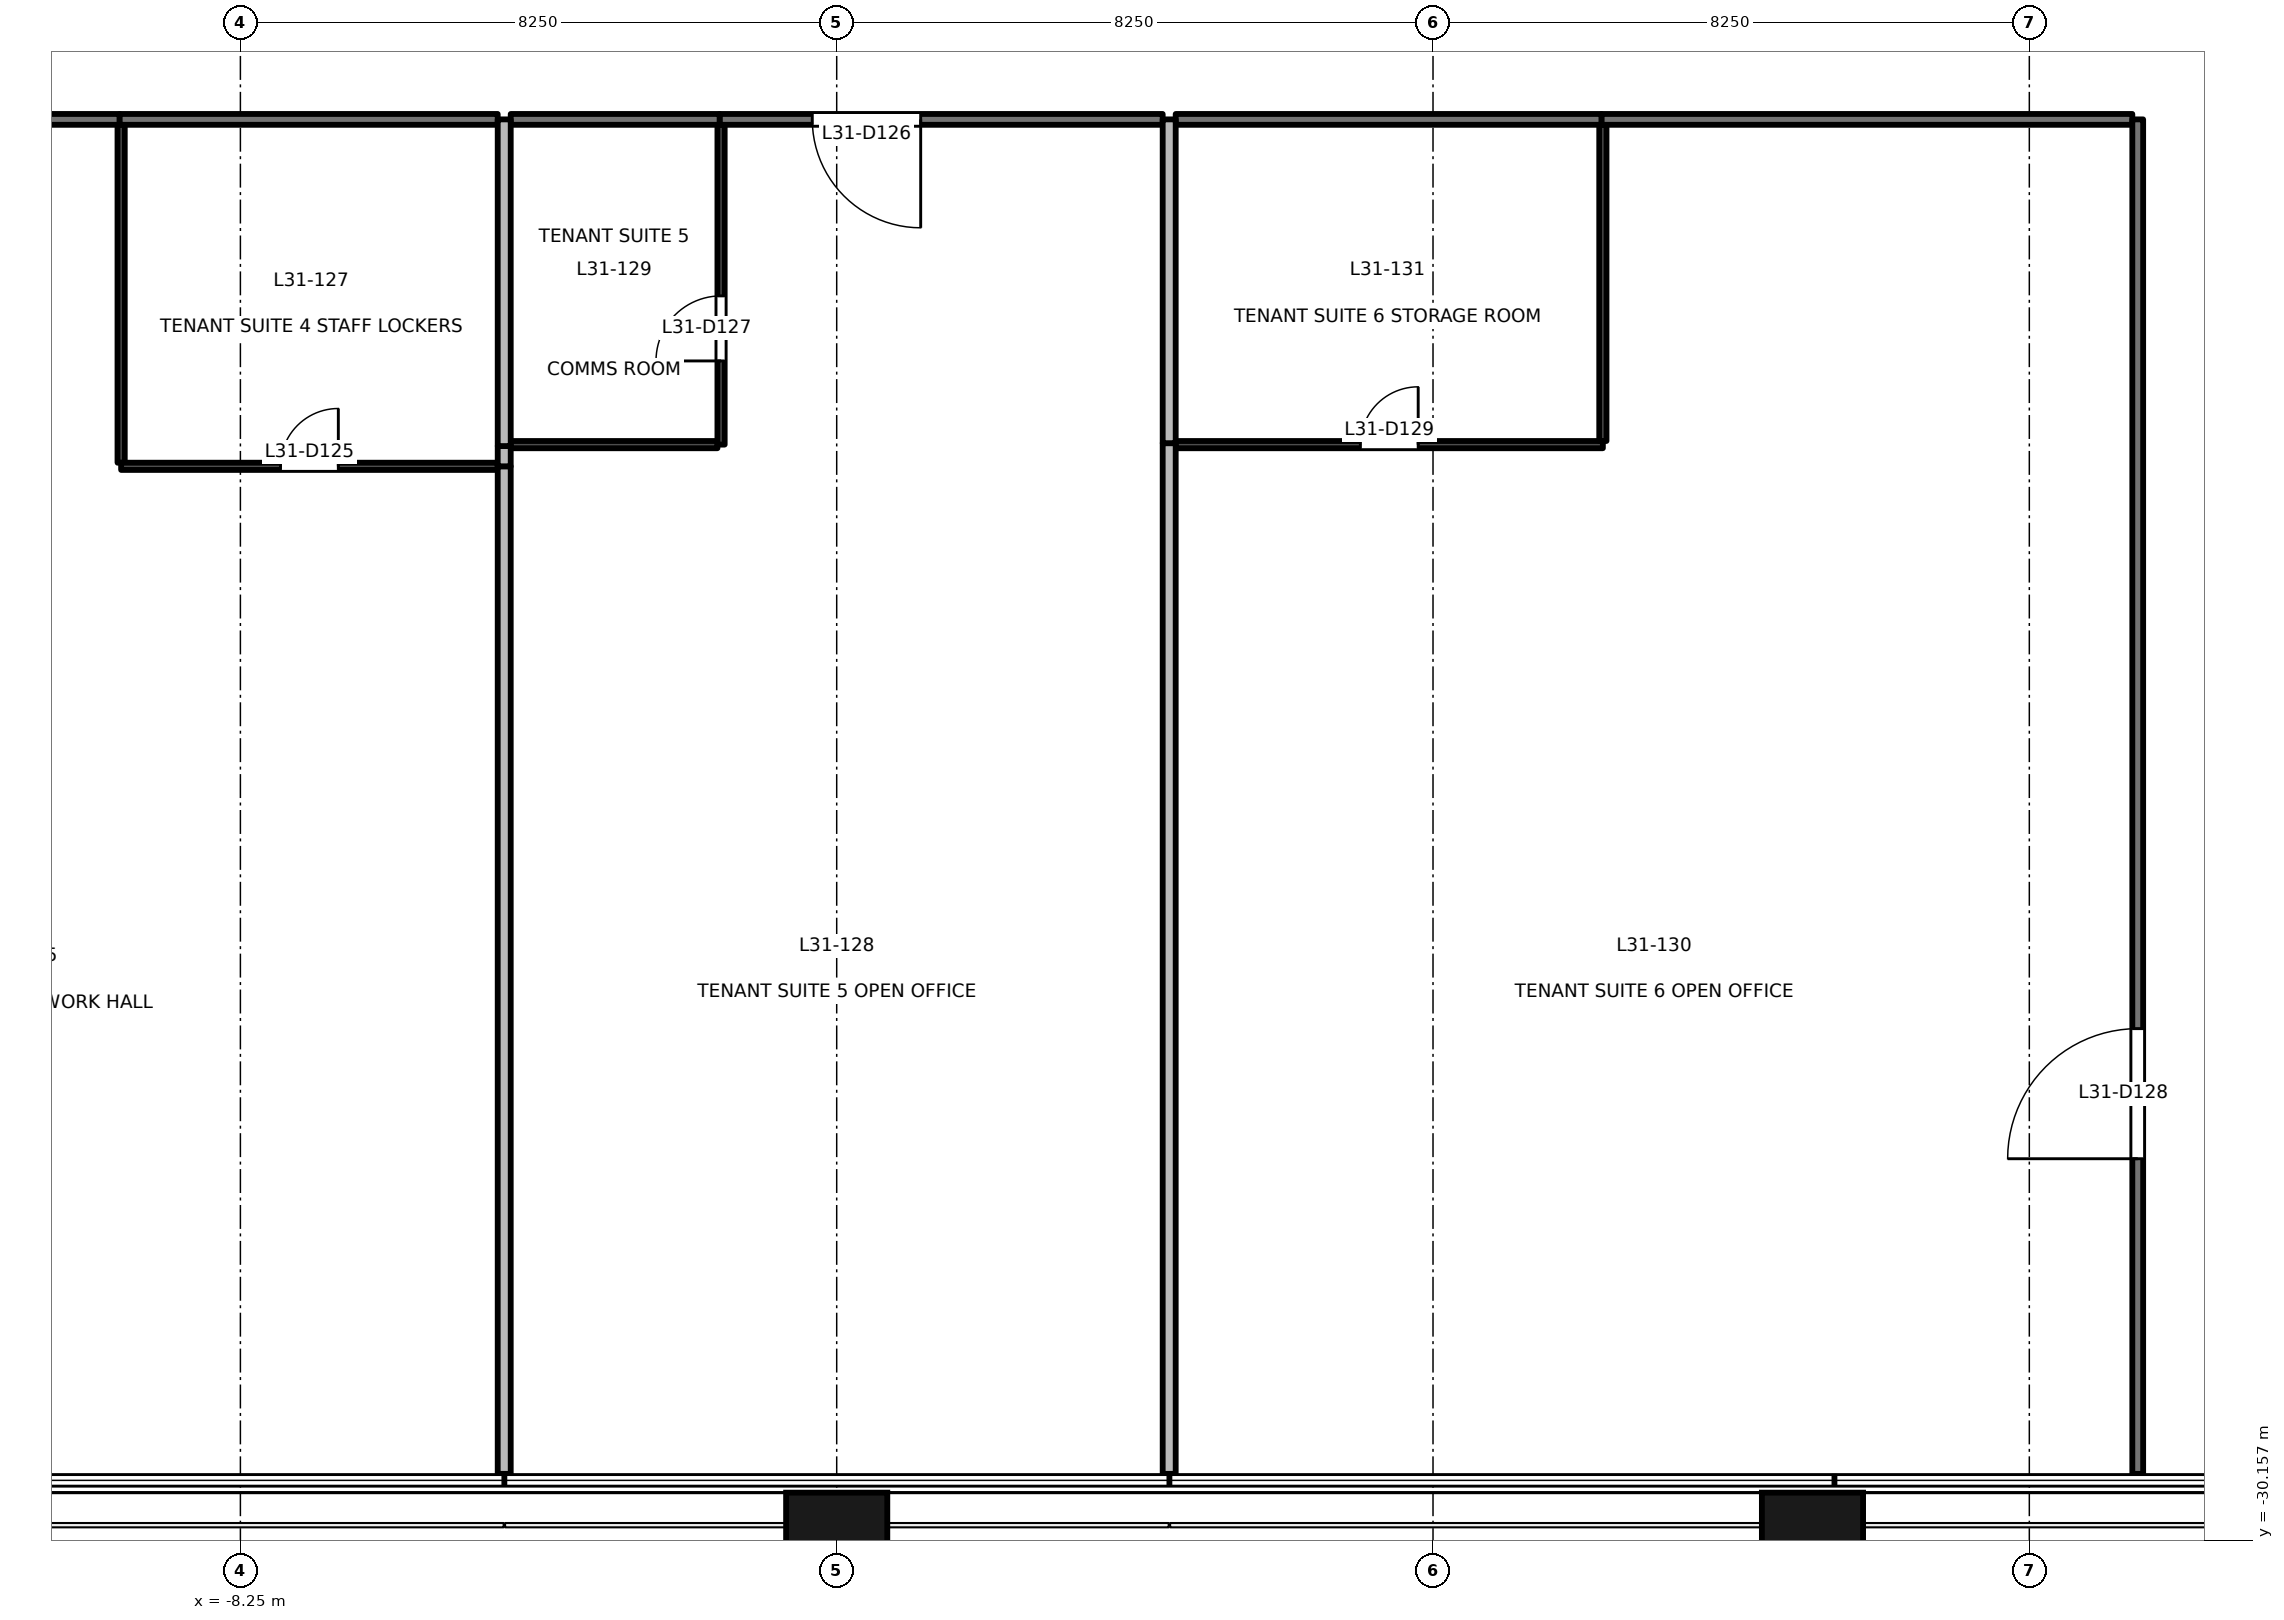
"""IFC4 building model, lengths in metres.
Left out: names, types, materials, properties, quantities, classifications, styles, units other than length and angle.
Written with IfcOpenShell. Run it as: python <this file> out.ifc"""

import sys

from ifc_helpers import new_model, si_unit, direction, frame, frame_2d, origin, origin_2d, place, context, subcontext, project, spatial, rectangle, extrude, element, fill, save


model = new_model("IFC4")
c1 = context("Model", 3, precision=1e-05, world=origin(), true_north=direction((0.0, 1.0)))
c2 = subcontext(c1, "Body", "Model", "MODEL_VIEW")
j1 = project(units=[si_unit("LENGTHUNIT", "METRE"), si_unit("PLANEANGLEUNIT", "RADIAN")], contexts=[c1])
p1 = place(None, origin())
s1 = spatial("IfcSite", under=j1, at=p1, CompositionType="ELEMENT")
p2 = place(p1, origin())
s2 = spatial("IfcBuilding", under=s1, at=p2, CompositionType="ELEMENT")
p3 = place(p2, frame((0.0, 0.0, 138.1)))
s3 = spatial("IfcBuildingStorey", under=s2, at=p3, CompositionType="ELEMENT", Elevation=138.1)
for number, where, z_axis, x_axis in (
    (1, (0.0, -30.4, -0.2), (0.0, 0.0, 1.0), (1.0, 0.0, 0.0)),
    (2, (13.5, -30.4, -0.2), (0.0, 0.0, 1.0), (1.0, 0.0, 0.0)),
):
    element("IfcColumn", number, at=place(p3, frame(where, z_axis=z_axis, x_axis=x_axis)), inside=s3, PredefinedType="COLUMN", context=c2, shape_type="SweptSolid", body=[
        extrude(rectangle(XDim=1.4, YDim=1.8, at=origin_2d()), origin(), (0.0, 0.0, 1.0), 4.0),
    ])
p4 = place(p3, frame((-9.92, -10.5, 0.0), z_axis=(0.0, 0.0, 1.0), x_axis=(-1.0, 0.0, 0.0)))
e3 = element("IfcWall", 3, at=p4, inside=s3, PredefinedType="PARTITIONING", context=c2, shape_type="SweptSolid", body=[
    extrude(rectangle(XDim=5.1, YDim=0.15, at=frame_2d((2.55, 0.0))), origin(), (0.0, 0.0, 1.0), 2.9),
])
p5 = place(p3, frame((-4.69, -10.5, 0.0), z_axis=(0.0, 0.0, 1.0), x_axis=(-1.0, 0.0, 0.0)))
e4 = element("IfcWall", 4, at=p5, inside=s3, PredefinedType="PARTITIONING", context=c2, shape_type="SweptSolid", body=[
    extrude(rectangle(XDim=5.23, YDim=0.15, at=frame_2d((2.615, 0.0))), origin(), (0.0, 0.0, 1.0), 2.9),
])
p6 = place(p3, frame((4.51, -10.5, 0.0), z_axis=(0.0, 0.0, 1.0), x_axis=(-1.0, 0.0, 0.0)))
e5 = element("IfcWall", 5, at=p6, inside=s3, PredefinedType="PARTITIONING", context=c2, shape_type="SweptSolid", body=[
    extrude(rectangle(XDim=6.13, YDim=0.15, at=frame_2d((3.065, 0.0))), origin(), (0.0, 0.0, 1.0), 2.9),
])
p7 = place(p6, frame((3.348, 0.0, 0.0)))
e6 = element("IfcOpeningElement", 6, at=p7, cuts=e5, PredefinedType="OPENING", context=c2, shape_type="SweptSolid", body=[
    extrude(rectangle(XDim=1.5, YDim=2.1, at=frame_2d((0.75, 1.05))), frame((0.0, 0.085, 0.0), z_axis=(0.0, -1.0, 0.0), x_axis=(1.0, 0.0, 0.0)), (0.0, 0.0, 1.0), 0.171),
])
p8 = place(p3, frame((-1.62, -10.5, 0.0), z_axis=(0.0, 0.0, 1.0), x_axis=(-1.0, 0.0, 0.0)))
e7 = element("IfcWall", 7, at=p8, inside=s3, PredefinedType="PARTITIONING", context=c2, shape_type="SweptSolid", body=[
    extrude(rectangle(XDim=2.89, YDim=0.15, at=frame_2d((1.445, 0.0))), origin(), (0.0, 0.0, 1.0), 2.9),
])
p9 = place(p3, frame((17.925, -10.5, 0.0), z_axis=(0.0, 0.0, 1.0), x_axis=(-1.0, 0.0, 0.0)))
e8 = element("IfcWall", 8, at=p9, inside=s3, PredefinedType="PARTITIONING", context=c2, shape_type="SweptSolid", body=[
    extrude(rectangle(XDim=7.345, YDim=0.15, at=frame_2d((3.672, 0.0))), origin(), (0.0, 0.0, 1.0), 2.9),
])
p10 = place(p3, frame((18.0, -29.24, 0.0), z_axis=(0.0, 0.0, 1.0), x_axis=(0.0, 1.0, 0.0)))
e9 = element("IfcWall", 9, at=p10, inside=s3, PredefinedType="PARTITIONING", context=c2, shape_type="SweptSolid", body=[
    extrude(rectangle(XDim=18.74, YDim=0.15, at=frame_2d((9.37, 0.0))), origin(), (0.0, 0.0, 1.0), 3.8),
])
p11 = place(p10, frame((4.36, 0.0, 0.0)))
e10 = element("IfcOpeningElement", 10, at=p11, cuts=e9, PredefinedType="OPENING", context=c2, shape_type="SweptSolid", body=[
    extrude(rectangle(XDim=1.8, YDim=2.1, at=frame_2d((0.9, 1.05))), frame((0.0, 0.085, 0.0), z_axis=(0.0, -1.0, 0.0), x_axis=(1.0, 0.0, 0.0)), (0.0, 0.0, 1.0), 0.171),
])
p12 = place(p3, frame((10.58, -10.5, 0.0), z_axis=(0.0, 0.0, 1.0), x_axis=(-1.0, 0.0, 0.0)))
e11 = element("IfcWall", 11, at=p12, inside=s3, PredefinedType="PARTITIONING", context=c2, shape_type="SweptSolid", body=[
    extrude(rectangle(XDim=5.89, YDim=0.15, at=frame_2d((2.945, 0.0))), origin(), (0.0, 0.0, 1.0), 2.9),
])
p13 = place(p3, frame((-9.9, -10.575, 0.0), z_axis=(0.0, 0.0, 1.0), x_axis=(0.0, -1.0, 0.0)))
e12 = element("IfcWall", 12, at=p13, inside=s3, PredefinedType="PARTITIONING", context=c2, shape_type="SweptSolid", body=[
    extrude(rectangle(XDim=4.675, YDim=0.1, at=frame_2d((2.337, 0.0))), origin(), (0.0, 0.0, 1.0), 3.8),
])
p14 = place(p3, frame((-9.9, -15.3, 0.0), z_axis=(0.0, 0.0, 1.0), x_axis=(1.0, 0.0, 0.0)))
e13 = element("IfcWall", 13, at=p14, inside=s3, PredefinedType="PARTITIONING", context=c2, shape_type="SweptSolid", body=[
    extrude(rectangle(XDim=5.21, YDim=0.1, at=frame_2d((2.605, 0.0))), origin(), (0.0, 0.0, 1.0), 2.9),
])
p15 = place(p14, frame((2.205, 0.0, 0.0)))
e14 = element("IfcOpeningElement", 14, at=p15, cuts=e13, PredefinedType="OPENING", context=c2, shape_type="SweptSolid", body=[
    extrude(rectangle(XDim=0.8, YDim=2.1, at=frame_2d((0.4, 1.05))), frame((0.0, 0.061, 0.0), z_axis=(0.0, -1.0, 0.0), x_axis=(1.0, 0.0, 0.0)), (0.0, 0.0, 1.0), 0.121),
])
p16 = place(p3, frame((-4.6, -15.3, 0.0), z_axis=(0.0, 0.0, 1.0), x_axis=(0.0, -1.0, 0.0)))
e15 = element("IfcWall", 15, at=p16, inside=s3, PredefinedType="PARTITIONING", context=c2, shape_type="SweptSolid", body=[
    extrude(rectangle(XDim=13.94, YDim=0.18, at=frame_2d((6.97, 0.0))), origin(), (0.0, 0.0, 1.0), 2.9),
])
p17 = place(p3, frame((-4.6, -15.02, 0.0), z_axis=(0.0, 0.0, 1.0), x_axis=(0.0, -1.0, 0.0)))
e16 = element("IfcWall", 16, at=p17, inside=s3, PredefinedType="PARTITIONING", context=c2, shape_type="SweptSolid", body=[
    extrude(rectangle(XDim=0.28, YDim=0.18, at=frame_2d((0.14, 0.0))), origin(), (0.0, 0.0, 1.0), 2.9),
])
p18 = place(p3, frame((-4.6, -10.5, 0.0), z_axis=(0.0, 0.0, 1.0), x_axis=(0.0, -1.0, 0.0)))
e17 = element("IfcWall", 17, at=p18, inside=s3, PredefinedType="PARTITIONING", context=c2, shape_type="SweptSolid", body=[
    extrude(rectangle(XDim=4.52, YDim=0.18, at=frame_2d((2.26, 0.0))), origin(), (0.0, 0.0, 1.0), 2.9),
])
p19 = place(p3, frame((-4.51, -15.0, 0.0), z_axis=(0.0, 0.0, 1.0), x_axis=(1.0, 0.0, 0.0)))
e18 = element("IfcWall", 18, at=p19, inside=s3, PredefinedType="PARTITIONING", context=c2, shape_type="SweptSolid", body=[
    extrude(rectangle(XDim=2.86, YDim=0.1, at=frame_2d((1.43, 0.0))), origin(), (0.0, 0.0, 1.0), 2.9),
])
p20 = place(p3, frame((-1.6, -15.0, 0.0), z_axis=(0.0, 0.0, 1.0), x_axis=(0.0, 1.0, 0.0)))
e19 = element("IfcWall", 19, at=p20, inside=s3, PredefinedType="PARTITIONING", context=c2, shape_type="SweptSolid", body=[
    extrude(rectangle(XDim=4.425, YDim=0.1, at=frame_2d((2.212, 0.0))), origin(), (0.0, 0.0, 1.0), 3.8),
])
p21 = place(p20, frame((1.158, 0.0, 0.0)))
e20 = element("IfcOpeningElement", 20, at=p21, cuts=e19, PredefinedType="OPENING", context=c2, shape_type="SweptSolid", body=[
    extrude(rectangle(XDim=0.9, YDim=2.1, at=frame_2d((0.45, 1.05))), frame((0.0, 0.061, 0.0), z_axis=(0.0, -1.0, 0.0), x_axis=(1.0, 0.0, 0.0)), (0.0, 0.0, 1.0), 0.121),
])
p22 = place(p3, frame((4.6, -14.98, 0.0), z_axis=(0.0, 0.0, 1.0), x_axis=(0.0, -1.0, 0.0)))
e21 = element("IfcWall", 21, at=p22, inside=s3, PredefinedType="PARTITIONING", context=c2, shape_type="SweptSolid", body=[
    extrude(rectangle(XDim=14.26, YDim=0.18, at=frame_2d((7.13, 0.0))), origin(), (0.0, 0.0, 1.0), 2.9),
])
p23 = place(p3, frame((4.6, -10.5, 0.0), z_axis=(0.0, 0.0, 1.0), x_axis=(0.0, -1.0, 0.0)))
e22 = element("IfcWall", 22, at=p23, inside=s3, PredefinedType="PARTITIONING", context=c2, shape_type="SweptSolid", body=[
    extrude(rectangle(XDim=4.48, YDim=0.18, at=frame_2d((2.24, 0.0))), origin(), (0.0, 0.0, 1.0), 2.9),
])
p24 = place(p3, frame((4.69, -15.0, 0.0), z_axis=(0.0, 0.0, 1.0), x_axis=(1.0, 0.0, 0.0)))
e23 = element("IfcWall", 23, at=p24, inside=s3, PredefinedType="PARTITIONING", context=c2, shape_type="SweptSolid", body=[
    extrude(rectangle(XDim=5.91, YDim=0.1, at=frame_2d((2.955, 0.0))), origin(), (0.0, 0.0, 1.0), 2.9),
])
p25 = place(p24, frame((2.555, 0.0, 0.0)))
e24 = element("IfcOpeningElement", 24, at=p25, cuts=e23, PredefinedType="OPENING", context=c2, shape_type="SweptSolid", body=[
    extrude(rectangle(XDim=0.8, YDim=2.1, at=frame_2d((0.4, 1.05))), frame((0.0, 0.061, 0.0), z_axis=(0.0, -1.0, 0.0), x_axis=(1.0, 0.0, 0.0)), (0.0, 0.0, 1.0), 0.121),
])
p26 = place(p3, frame((10.6, -14.95, 0.0), z_axis=(0.0, 0.0, 1.0), x_axis=(0.0, 1.0, 0.0)))
e25 = element("IfcWall", 25, at=p26, inside=s3, PredefinedType="PARTITIONING", context=c2, shape_type="SweptSolid", body=[
    extrude(rectangle(XDim=4.375, YDim=0.1, at=frame_2d((2.188, 0.0))), origin(), (0.0, 0.0, 1.0), 3.8),
])
p27 = place(p15, origin())
e26 = element("IfcDoor", 26, at=p27, inside=s3, OperationType="SINGLE_SWING_RIGHT", PredefinedType="DOOR", context=c2, shape_type="SweptSolid", body=[
    extrude(rectangle(XDim=0.8, YDim=2.1, at=frame_2d((0.4, 1.05))), frame((0.0, 0.025, 0.0), z_axis=(0.0, -1.0, 0.0), x_axis=(1.0, 0.0, 0.0)), (0.0, 0.0, 1.0), 0.05),
])
fill(e14, e26)
p28 = place(p7, origin())
e27 = element("IfcDoor", 27, at=p28, inside=s3, OperationType="DOUBLE_DOOR_SINGLE_SWING", PredefinedType="DOOR", context=c2, shape_type="SweptSolid", body=[
    extrude(rectangle(XDim=1.5, YDim=2.1, at=frame_2d((0.75, 1.05))), frame((0.0, 0.025, 0.0), z_axis=(0.0, -1.0, 0.0), x_axis=(1.0, 0.0, 0.0)), (0.0, 0.0, 1.0), 0.05),
])
fill(e6, e27)
p29 = place(p21, origin())
e28 = element("IfcDoor", 28, at=p29, inside=s3, OperationType="SINGLE_SWING_LEFT", PredefinedType="DOOR", context=c2, shape_type="SweptSolid", body=[
    extrude(rectangle(XDim=0.9, YDim=2.1, at=frame_2d((0.45, 1.05))), frame((0.0, 0.025, 0.0), z_axis=(0.0, -1.0, 0.0), x_axis=(1.0, 0.0, 0.0)), (0.0, 0.0, 1.0), 0.05),
])
fill(e20, e28)
p30 = place(p11, origin())
e29 = element("IfcDoor", 29, at=p30, inside=s3, OperationType="DOUBLE_DOOR_SINGLE_SWING", PredefinedType="DOOR", context=c2, shape_type="SweptSolid", body=[
    extrude(rectangle(XDim=1.8, YDim=2.1, at=frame_2d((0.9, 1.05))), frame((0.0, 0.025, 0.0), z_axis=(0.0, -1.0, 0.0), x_axis=(1.0, 0.0, 0.0)), (0.0, 0.0, 1.0), 0.05),
])
fill(e10, e29)
p31 = place(p25, origin())
e30 = element("IfcDoor", 30, at=p31, inside=s3, OperationType="SINGLE_SWING_RIGHT", PredefinedType="DOOR", context=c2, shape_type="SweptSolid", body=[
    extrude(rectangle(XDim=0.8, YDim=2.1, at=frame_2d((0.4, 1.05))), frame((0.0, 0.025, 0.0), z_axis=(0.0, -1.0, 0.0), x_axis=(1.0, 0.0, 0.0)), (0.0, 0.0, 1.0), 0.05),
])
fill(e24, e30)
save(model, sys.argv[1])
